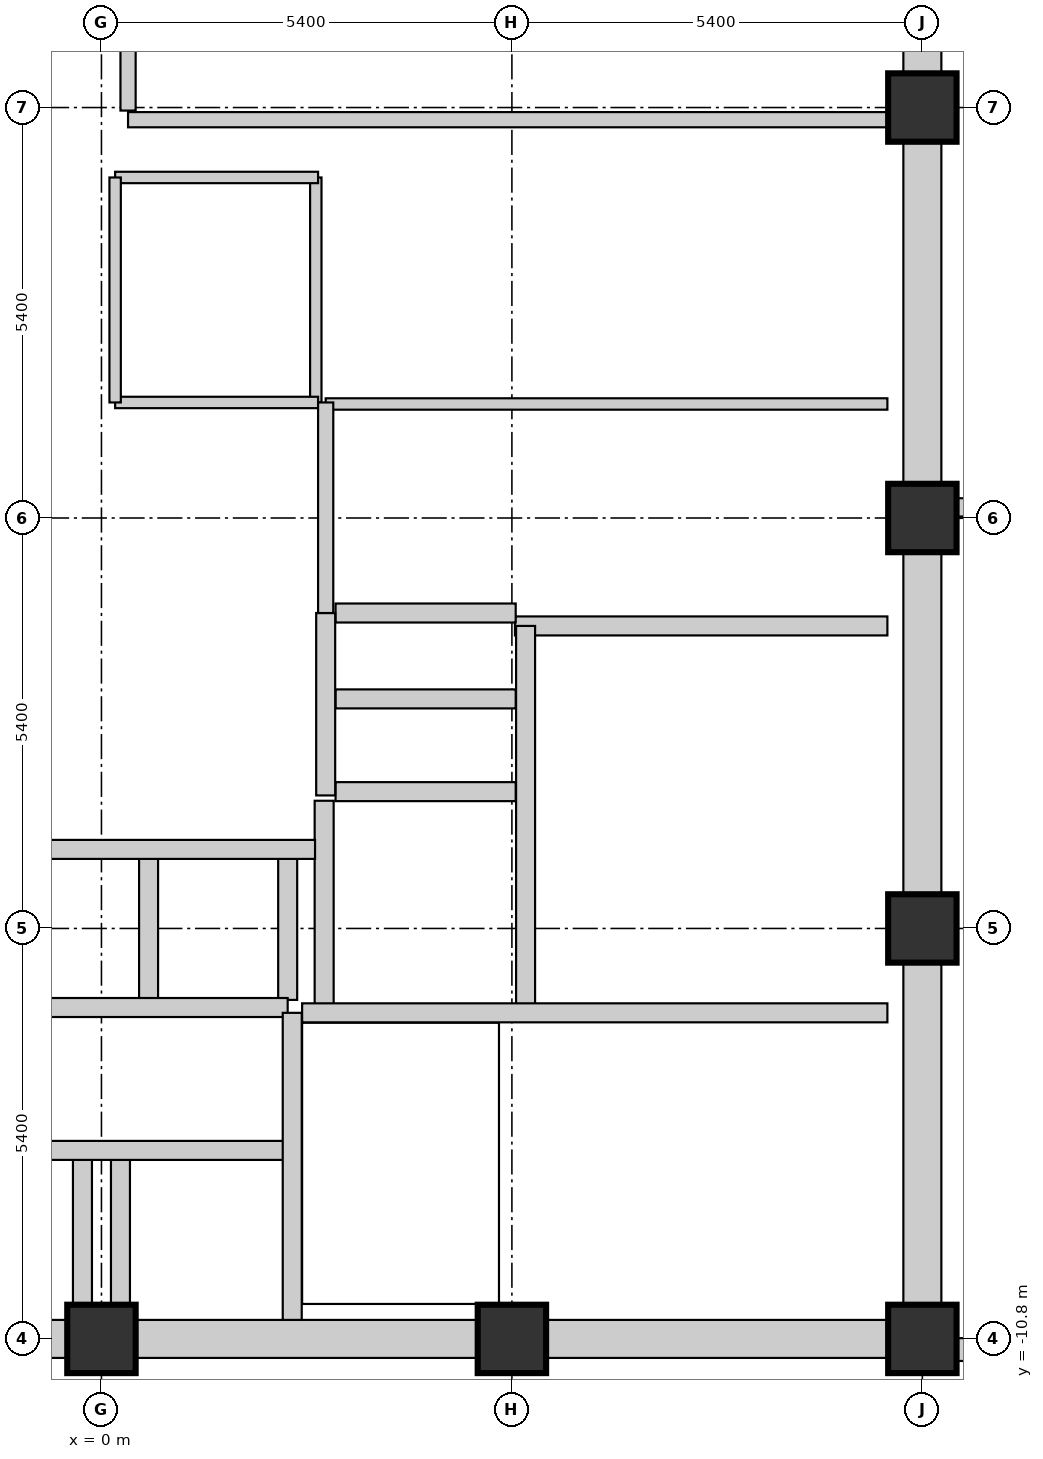
"""IFC4 building model, lengths in metres.
Left out: names, types, materials, properties, quantities, classifications, styles, units other than length and angle.
Written with IfcOpenShell. Run it as: python <this file> out.ifc"""

import sys

from ifc_helpers import new_model, si_unit, direction, frame, frame_2d, origin, origin_2d, place, context, subcontext, project, spatial, rectangle, extrude, element, fill, save


model = new_model("IFC4")
c1 = context("Model", 3, precision=1e-05, world=origin(), true_north=direction((0.0, 1.0)))
c2 = subcontext(c1, "Body", "Model", "MODEL_VIEW")
j1 = project(units=[si_unit("LENGTHUNIT", "METRE"), si_unit("PLANEANGLEUNIT", "RADIAN")], contexts=[c1])
p1 = place(None, origin())
s1 = spatial("IfcSite", under=j1, at=p1, CompositionType="ELEMENT")
p2 = place(p1, origin())
s2 = spatial("IfcBuilding", under=s1, at=p2, CompositionType="ELEMENT")
p3 = place(p2, frame((0.0, 0.0, 337.5)))
s3 = spatial("IfcBuildingStorey", under=s2, at=p3, CompositionType="ELEMENT", Elevation=337.5)
for number, where, z_axis, x_axis in (
    (1, (0.0, -10.8, 0.0), (0.0, 0.0, 1.0), (1.0, 0.0, 0.0)),
    (2, (5.4, -10.8, 0.0), (0.0, 0.0, 1.0), (1.0, 0.0, 0.0)),
    (3, (10.8, -10.8, 0.0), (0.0, 0.0, 1.0), (1.0, 0.0, 0.0)),
    (4, (10.8, -5.4, 0.0), (0.0, 0.0, 1.0), (1.0, 0.0, 0.0)),
    (5, (10.8, 0.0, 0.0), (0.0, 0.0, 1.0), (1.0, 0.0, 0.0)),
    (6, (10.8, 5.4, 0.0), (0.0, 0.0, 1.0), (1.0, 0.0, 0.0)),
):
    element("IfcColumn", number, at=place(p3, frame(where, z_axis=z_axis, x_axis=x_axis)), inside=s3, PredefinedType="COLUMN", context=c2, shape_type="SweptSolid", body=[
        extrude(rectangle(XDim=0.9, YDim=0.9, at=origin_2d()), origin(), (0.0, 0.0, 1.0), 4.5),
    ])
for number, where, z_axis, x_axis in (
    (7, (10.8, -10.34, 0.0), (0.0, 0.0, 1.0), (0.0, 1.0, 0.0)),
    (8, (-4.94, -10.8, 0.0), (0.0, 0.0, 1.0), (1.0, 0.0, 0.0)),
    (9, (10.8, -4.94, 0.0), (0.0, 0.0, 1.0), (0.0, 1.0, 0.0)),
    (10, (0.46, -10.8, 0.0), (0.0, 0.0, 1.0), (1.0, 0.0, 0.0)),
    (11, (10.8, 0.46, 0.0), (0.0, 0.0, 1.0), (0.0, 1.0, 0.0)),
    (12, (5.86, -10.8, 0.0), (0.0, 0.0, 1.0), (1.0, 0.0, 0.0)),
    (13, (10.8, 5.86, 0.0), (0.0, 0.0, 1.0), (0.0, 1.0, 0.0)),
):
    element("IfcWall", number, at=place(p3, frame(where, z_axis=z_axis, x_axis=x_axis)), inside=s3, PredefinedType="SHEAR", context=c2, shape_type="SweptSolid", body=[
        extrude(rectangle(XDim=4.48, YDim=0.5, at=frame_2d((2.24, 0.0))), origin(), (0.0, 0.0, 1.0), 4.5),
    ])
p4 = place(p3, frame((11.254, -10.94, 0.0), z_axis=(0.0, 0.0, 1.0), x_axis=(1.0, 0.0, 0.0)))
e14 = element("IfcWall", 14, at=p4, inside=s3, PredefinedType="STANDARD", context=c2, shape_type="SweptSolid", body=[
    extrude(rectangle(XDim=3.706, YDim=0.3, at=frame_2d((1.853, 0.0))), origin(), (0.0, 0.0, 1.0), 3.507),
])
p5 = place(p4, frame((1.328, 0.0, 0.75)))
e15 = element("IfcOpeningElement", 15, at=p5, cuts=e14, PredefinedType="OPENING", context=c2, shape_type="SweptSolid", body=[
    extrude(rectangle(XDim=1.05, YDim=1.5, at=frame_2d((0.525, 0.75))), frame((0.0, 0.16, 0.0), z_axis=(0.0, -1.0, 0.0), x_axis=(1.0, 0.0, 0.0)), (0.0, 0.0, 1.0), 0.32),
])
p6 = place(p3, frame((11.254, 0.14, 0.0), z_axis=(0.0, 0.0, 1.0), x_axis=(1.0, 0.0, 0.0)))
e16 = element("IfcWall", 16, at=p6, inside=s3, PredefinedType="STANDARD", context=c2, shape_type="SweptSolid", body=[
    extrude(rectangle(XDim=0.606, YDim=0.24, at=frame_2d((0.303, 0.0))), origin(), (0.0, 0.0, 1.0), 3.507),
])
p7 = place(p3, frame((2.93, -6.51, 0.0), z_axis=(0.0, 0.0, 1.0), x_axis=(0.0, 1.0, 0.0)))
e17 = element("IfcWall", 17, at=p7, inside=s3, PredefinedType="SHEAR", context=c2, shape_type="SweptSolid", body=[
    extrude(rectangle(XDim=2.79, YDim=0.25, at=frame_2d((1.395, 0.0))), origin(), (0.0, 0.0, 1.0), 4.5),
])
p8 = place(p3, frame((5.44, -1.42, 0.0), z_axis=(0.0, 0.0, 1.0), x_axis=(1.0, 0.0, 0.0)))
e18 = element("IfcWall", 18, at=p8, inside=s3, PredefinedType="SHEAR", context=c2, shape_type="SweptSolid", body=[
    extrude(rectangle(XDim=4.9, YDim=0.25, at=frame_2d((2.45, 0.0))), origin(), (0.0, 0.0, 1.0), 4.5),
])
p9 = place(p8, frame((1.94, 0.0, 0.0)))
e19 = element("IfcOpeningElement", 19, at=p9, cuts=e18, PredefinedType="OPENING", context=c2, shape_type="SweptSolid", body=[
    extrude(rectangle(XDim=1.1, YDim=2.1, at=frame_2d((0.55, 1.05))), frame((0.0, 0.135, 0.0), z_axis=(0.0, -1.0, 0.0), x_axis=(1.0, 0.0, 0.0)), (0.0, 0.0, 1.0), 0.27),
])
p10 = place(p3, frame((3.08, -3.6, 0.0), z_axis=(0.0, 0.0, 1.0), x_axis=(1.0, 0.0, 0.0)))
e20 = element("IfcWall", 20, at=p10, inside=s3, PredefinedType="SHEAR", context=c2, shape_type="SweptSolid", body=[
    extrude(rectangle(XDim=2.37, YDim=0.25, at=frame_2d((1.185, 0.0))), origin(), (0.0, 0.0, 1.0), 4.5),
])
p11 = place(p3, frame((5.58, -6.51, 0.0), z_axis=(0.0, 0.0, 1.0), x_axis=(0.0, 1.0, 0.0)))
e21 = element("IfcWall", 21, at=p11, inside=s3, PredefinedType="SHEAR", context=c2, shape_type="SweptSolid", body=[
    extrude(rectangle(XDim=5.09, YDim=0.25, at=frame_2d((2.545, 0.0))), origin(), (0.0, 0.0, 1.0), 4.5),
])
p12 = place(p11, frame((0.85, 0.0, 0.0)))
e22 = element("IfcOpeningElement", 22, at=p12, cuts=e21, PredefinedType="OPENING", context=c2, shape_type="SweptSolid", body=[
    extrude(rectangle(XDim=1.1, YDim=2.1, at=frame_2d((0.55, 1.05))), frame((0.0, 0.135, 0.0), z_axis=(0.0, -1.0, 0.0), x_axis=(1.0, 0.0, 0.0)), (0.0, 0.0, 1.0), 0.27),
])
for number, where, z_axis, x_axis in (
    (23, (0.62, -6.34, 0.0), (0.0, 0.0, 1.0), (0.0, 1.0, 0.0)),
    (24, (2.45, -6.34, 0.0), (0.0, 0.0, 1.0), (0.0, 1.0, 0.0)),
):
    element("IfcWall", number, at=place(p3, frame(where, z_axis=z_axis, x_axis=x_axis)), inside=s3, PredefinedType="SHEAR", context=c2, shape_type="SweptSolid", body=[
        extrude(rectangle(XDim=1.88, YDim=0.25, at=frame_2d((0.94, 0.0))), origin(), (0.0, 0.0, 1.0), 4.5),
    ])
for number, where, z_axis, x_axis in (
    (25, (-0.25, -10.35, 0.0), (0.0, 0.0, 1.0), (0.0, 1.0, 0.0)),
    (26, (0.25, -10.35, 0.0), (0.0, 0.0, 1.0), (0.0, 1.0, 0.0)),
):
    element("IfcWall", number, at=place(p3, frame(where, z_axis=z_axis, x_axis=x_axis)), inside=s3, PredefinedType="SHEAR", context=c2, shape_type="SweptSolid", body=[
        extrude(rectangle(XDim=1.91, YDim=0.25, at=frame_2d((0.955, 0.0))), origin(), (0.0, 0.0, 1.0), 4.5),
    ])
p13 = place(p3, frame((-1.22, -6.44, 0.0), z_axis=(0.0, 0.0, 1.0), x_axis=(1.0, 0.0, 0.0)))
e27 = element("IfcWall", 27, at=p13, inside=s3, PredefinedType="SHEAR", context=c2, shape_type="SweptSolid", body=[
    extrude(rectangle(XDim=3.67, YDim=0.25, at=frame_2d((1.835, 0.0))), origin(), (0.0, 0.0, 1.0), 4.5),
])
p14 = place(p13, frame((0.35, 0.0, 0.0)))
e28 = element("IfcOpeningElement", 28, at=p14, cuts=e27, PredefinedType="OPENING", context=c2, shape_type="SweptSolid", body=[
    extrude(rectangle(XDim=1.1, YDim=2.1, at=frame_2d((0.55, 1.05))), frame((0.0, 0.135, 0.0), z_axis=(0.0, -1.0, 0.0), x_axis=(1.0, 0.0, 0.0)), (0.0, 0.0, 1.0), 0.27),
])
p15 = place(p13, frame((2.22, 0.0, 0.0)))
e29 = element("IfcOpeningElement", 29, at=p15, cuts=e27, PredefinedType="OPENING", context=c2, shape_type="SweptSolid", body=[
    extrude(rectangle(XDim=1.1, YDim=2.1, at=frame_2d((0.55, 1.05))), frame((0.0, 0.135, 0.0), z_axis=(0.0, -1.0, 0.0), x_axis=(1.0, 0.0, 0.0)), (0.0, 0.0, 1.0), 0.27),
])
p16 = place(p3, frame((-2.48, -8.32, 0.0), z_axis=(0.0, 0.0, 1.0), x_axis=(1.0, 0.0, 0.0)))
e30 = element("IfcWall", 30, at=p16, inside=s3, PredefinedType="SHEAR", context=c2, shape_type="SweptSolid", body=[
    extrude(rectangle(XDim=4.93, YDim=0.25, at=frame_2d((2.465, 0.0))), origin(), (0.0, 0.0, 1.0), 4.5),
])
p17 = place(p16, frame((0.55, 0.0, 0.0)))
e31 = element("IfcOpeningElement", 31, at=p17, cuts=e30, PredefinedType="OPENING", context=c2, shape_type="SweptSolid", body=[
    extrude(rectangle(XDim=1.1, YDim=2.1, at=frame_2d((0.55, 1.05))), frame((0.0, 0.135, 0.0), z_axis=(0.0, -1.0, 0.0), x_axis=(1.0, 0.0, 0.0)), (0.0, 0.0, 1.0), 0.27),
])
p18 = place(p16, frame((3.25, 0.0, 0.0)))
e32 = element("IfcOpeningElement", 32, at=p18, cuts=e30, PredefinedType="OPENING", context=c2, shape_type="SweptSolid", body=[
    extrude(rectangle(XDim=1.1, YDim=2.1, at=frame_2d((0.55, 1.05))), frame((0.0, 0.135, 0.0), z_axis=(0.0, -1.0, 0.0), x_axis=(1.0, 0.0, 0.0)), (0.0, 0.0, 1.0), 0.27),
])
p19 = place(p3, frame((-1.22, -4.36, 0.0), z_axis=(0.0, 0.0, 1.0), x_axis=(1.0, 0.0, 0.0)))
e33 = element("IfcWall", 33, at=p19, inside=s3, PredefinedType="SHEAR", context=c2, shape_type="SweptSolid", body=[
    extrude(rectangle(XDim=4.03, YDim=0.25, at=frame_2d((2.015, 0.0))), origin(), (0.0, 0.0, 1.0), 4.5),
])
for number, where, z_axis, x_axis in (
    (34, (3.08, -2.38, 0.0), (0.0, 0.0, 1.0), (1.0, 0.0, 0.0)),
    (35, (3.08, -1.25, 0.0), (0.0, 0.0, 1.0), (1.0, 0.0, 0.0)),
):
    element("IfcWall", number, at=place(p3, frame(where, z_axis=z_axis, x_axis=x_axis)), inside=s3, PredefinedType="SHEAR", context=c2, shape_type="SweptSolid", body=[
        extrude(rectangle(XDim=2.37, YDim=0.25, at=frame_2d((1.185, 0.0))), origin(), (0.0, 0.0, 1.0), 4.5),
    ])
p20 = place(p3, frame((2.95, -3.65, 0.0), z_axis=(0.0, 0.0, 1.0), x_axis=(0.0, 1.0, 0.0)))
e36 = element("IfcWall", 36, at=p20, inside=s3, PredefinedType="SHEAR", context=c2, shape_type="SweptSolid", body=[
    extrude(rectangle(XDim=2.4, YDim=0.25, at=frame_2d((1.2, 0.0))), origin(), (0.0, 0.0, 1.0), 4.5),
])
p21 = place(p20, frame((0.775, 0.0, 0.0)))
e37 = element("IfcOpeningElement", 37, at=p21, cuts=e36, PredefinedType="OPENING", context=c2, shape_type="SweptSolid", body=[
    extrude(rectangle(XDim=0.85, YDim=2.1, at=frame_2d((0.425, 1.05))), frame((0.0, 0.135, 0.0), z_axis=(0.0, -1.0, 0.0), x_axis=(1.0, 0.0, 0.0)), (0.0, 0.0, 1.0), 0.27),
])
p22 = place(p3, frame((2.64, -6.51, 0.0), z_axis=(0.0, 0.0, 1.0), x_axis=(1.0, 0.0, 0.0)))
e38 = element("IfcWall", 38, at=p22, inside=s3, PredefinedType="SHEAR", context=c2, shape_type="SweptSolid", body=[
    extrude(rectangle(XDim=7.7, YDim=0.25, at=frame_2d((3.85, 0.0))), origin(), (0.0, 0.0, 1.0), 4.5),
])
p23 = place(p22, frame((6.0, 0.0, 0.0)))
e39 = element("IfcOpeningElement", 39, at=p23, cuts=e38, PredefinedType="OPENING", context=c2, shape_type="SweptSolid", body=[
    extrude(rectangle(XDim=0.95, YDim=2.1, at=frame_2d((0.475, 1.05))), frame((0.0, 0.135, 0.0), z_axis=(0.0, -1.0, 0.0), x_axis=(1.0, 0.0, 0.0)), (0.0, 0.0, 1.0), 0.27),
])
p24 = place(p3, frame((2.51, -10.55, 0.0), z_axis=(0.0, 0.0, 1.0), x_axis=(0.0, 1.0, 0.0)))
e40 = element("IfcWall", 40, at=p24, inside=s3, PredefinedType="SHEAR", context=c2, shape_type="SweptSolid", body=[
    extrude(rectangle(XDim=4.04, YDim=0.25, at=frame_2d((2.02, 0.0))), origin(), (0.0, 0.0, 1.0), 4.5),
])
p25 = place(p3, frame((2.82, 1.52, 0.0), z_axis=(0.0, 0.0, 1.0), x_axis=(0.0, 1.0, 0.0)))
e41 = element("IfcWall", 41, at=p25, inside=s3, PredefinedType="PARTITIONING", context=c2, shape_type="SweptSolid", body=[
    extrude(rectangle(XDim=2.96, YDim=0.15, at=frame_2d((1.48, 0.0))), origin(), (0.0, 0.0, 1.0), 4.22),
])
for number, where, z_axis, x_axis in (
    (42, (0.18, 4.48, 0.0), (0.0, 0.0, 1.0), (1.0, 0.0, 0.0)),
    (43, (0.18, 1.52, 0.0), (0.0, 0.0, 1.0), (1.0, 0.0, 0.0)),
):
    element("IfcWall", number, at=place(p3, frame(where, z_axis=z_axis, x_axis=x_axis)), inside=s3, PredefinedType="PARTITIONING", context=c2, shape_type="SweptSolid", body=[
        extrude(rectangle(XDim=2.67, YDim=0.15, at=frame_2d((1.335, 0.0))), origin(), (0.0, 0.0, 1.0), 4.22),
    ])
p26 = place(p3, frame((0.18, 1.52, 0.0), z_axis=(0.0, 0.0, 1.0), x_axis=(0.0, 1.0, 0.0)))
e44 = element("IfcWall", 44, at=p26, inside=s3, PredefinedType="PARTITIONING", context=c2, shape_type="SweptSolid", body=[
    extrude(rectangle(XDim=2.96, YDim=0.15, at=frame_2d((1.48, 0.0))), origin(), (0.0, 0.0, 1.0), 4.22),
])
p27 = place(p26, frame((0.95, 0.0, 0.0)))
e45 = element("IfcOpeningElement", 45, at=p27, cuts=e44, PredefinedType="OPENING", context=c2, shape_type="SweptSolid", body=[
    extrude(rectangle(XDim=0.85, YDim=2.1, at=frame_2d((0.425, 1.05))), frame((0.0, 0.085, 0.0), z_axis=(0.0, -1.0, 0.0), x_axis=(1.0, 0.0, 0.0)), (0.0, 0.0, 1.0), 0.17),
])
p28 = place(p3, frame((2.95, 1.5, 0.0), z_axis=(0.0, 0.0, 1.0), x_axis=(1.0, 0.0, 0.0)))
e46 = element("IfcWall", 46, at=p28, inside=s3, PredefinedType="PARTITIONING", context=c2, shape_type="SweptSolid", body=[
    extrude(rectangle(XDim=7.39, YDim=0.15, at=frame_2d((3.695, 0.0))), origin(), (0.0, 0.0, 1.0), 4.22),
])
p29 = place(p28, frame((2.2, 0.0, 0.0)))
e47 = element("IfcOpeningElement", 47, at=p29, cuts=e46, PredefinedType="OPENING", context=c2, shape_type="SweptSolid", body=[
    extrude(rectangle(XDim=0.95, YDim=2.1, at=frame_2d((0.475, 1.05))), frame((0.0, 0.085, 0.0), z_axis=(0.0, -1.0, 0.0), x_axis=(1.0, 0.0, 0.0)), (0.0, 0.0, 1.0), 0.17),
])
p30 = place(p3, frame((0.35, 5.24, 0.0), z_axis=(0.0, 0.0, 1.0), x_axis=(1.0, 0.0, 0.0)))
e48 = element("IfcWall", 48, at=p30, inside=s3, PredefinedType="PARTITIONING", context=c2, shape_type="SweptSolid", body=[
    extrude(rectangle(XDim=9.99, YDim=0.2, at=frame_2d((4.995, 0.0))), origin(), (0.0, 0.0, 1.0), 4.22),
])
p31 = place(p30, frame((0.8, 0.0, 0.0)))
e49 = element("IfcOpeningElement", 49, at=p31, cuts=e48, PredefinedType="OPENING", context=c2, shape_type="SweptSolid", body=[
    extrude(rectangle(XDim=1.1, YDim=2.1, at=frame_2d((0.55, 1.05))), frame((0.0, 0.11, 0.0), z_axis=(0.0, -1.0, 0.0), x_axis=(1.0, 0.0, 0.0)), (0.0, 0.0, 1.0), 0.22),
])
p32 = place(p3, frame((0.35, 5.36, 0.0), z_axis=(0.0, 0.0, 1.0), x_axis=(0.0, 1.0, 0.0)))
e50 = element("IfcWall", 50, at=p32, inside=s3, PredefinedType="PARTITIONING", context=c2, shape_type="SweptSolid", body=[
    extrude(rectangle(XDim=4.98, YDim=0.2, at=frame_2d((2.49, 0.0))), origin(), (0.0, 0.0, 1.0), 4.22),
])
p33 = place(p3, frame((2.95, -1.25, 0.0), z_axis=(0.0, 0.0, 1.0), x_axis=(0.0, 1.0, 0.0)))
e51 = element("IfcWall", 51, at=p33, inside=s3, PredefinedType="PARTITIONING", context=c2, shape_type="SweptSolid", body=[
    extrude(rectangle(XDim=2.77, YDim=0.2, at=frame_2d((1.385, 0.0))), origin(), (0.0, 0.0, 1.0), 4.22),
])
p34 = place(p33, frame((0.6, 0.0, 0.0)))
e52 = element("IfcOpeningElement", 52, at=p34, cuts=e51, PredefinedType="OPENING", context=c2, shape_type="SweptSolid", body=[
    extrude(rectangle(XDim=1.1, YDim=2.1, at=frame_2d((0.55, 1.05))), frame((0.0, 0.11, 0.0), z_axis=(0.0, -1.0, 0.0), x_axis=(1.0, 0.0, 0.0)), (0.0, 0.0, 1.0), 0.22),
])
p35 = place(p27, origin())
e53 = element("IfcDoor", 53, at=p35, inside=s3, OperationType="SINGLE_SWING_RIGHT", PredefinedType="DOOR", context=c2, shape_type="SweptSolid", body=[
    extrude(rectangle(XDim=0.85, YDim=2.1, at=frame_2d((0.425, 1.05))), frame((0.0, 0.025, 0.0), z_axis=(0.0, -1.0, 0.0), x_axis=(1.0, 0.0, 0.0)), (0.0, 0.0, 1.0), 0.05),
])
fill(e45, e53)
p36 = place(p23, origin())
e54 = element("IfcDoor", 54, at=p36, inside=s3, OperationType="SINGLE_SWING_RIGHT", PredefinedType="DOOR", context=c2, shape_type="SweptSolid", body=[
    extrude(rectangle(XDim=0.95, YDim=2.1, at=frame_2d((0.475, 1.05))), frame((0.0, 0.025, 0.0), z_axis=(0.0, -1.0, 0.0), x_axis=(1.0, 0.0, 0.0)), (0.0, 0.0, 1.0), 0.05),
])
fill(e39, e54)
p37 = place(p21, origin())
e55 = element("IfcDoor", 55, at=p37, inside=s3, OperationType="SINGLE_SWING_LEFT", PredefinedType="DOOR", context=c2, shape_type="SweptSolid", body=[
    extrude(rectangle(XDim=0.85, YDim=2.1, at=frame_2d((0.425, 1.05))), frame((0.0, 0.025, 0.0), z_axis=(0.0, -1.0, 0.0), x_axis=(1.0, 0.0, 0.0)), (0.0, 0.0, 1.0), 0.05),
])
fill(e37, e55)
p38 = place(p9, origin())
e56 = element("IfcDoor", 56, at=p38, inside=s3, OperationType="SINGLE_SWING_LEFT", PredefinedType="DOOR", context=c2, shape_type="SweptSolid", body=[
    extrude(rectangle(XDim=1.1, YDim=2.1, at=frame_2d((0.55, 1.05))), frame((0.0, 0.025, 0.0), z_axis=(0.0, -1.0, 0.0), x_axis=(1.0, 0.0, 0.0)), (0.0, 0.0, 1.0), 0.05),
])
fill(e19, e56)
p39 = place(p12, origin())
e57 = element("IfcDoor", 57, at=p39, inside=s3, OperationType="SLIDING_TO_RIGHT", PredefinedType="DOOR", context=c2, shape_type="SweptSolid", body=[
    extrude(rectangle(XDim=1.1, YDim=2.1, at=frame_2d((0.55, 1.05))), frame((0.0, 0.025, 0.0), z_axis=(0.0, -1.0, 0.0), x_axis=(1.0, 0.0, 0.0)), (0.0, 0.0, 1.0), 0.05),
])
fill(e22, e57)
p40 = place(p31, origin())
e58 = element("IfcDoor", 58, at=p40, inside=s3, OperationType="SINGLE_SWING_LEFT", PredefinedType="DOOR", context=c2, shape_type="SweptSolid", body=[
    extrude(rectangle(XDim=1.1, YDim=2.1, at=frame_2d((0.55, 1.05))), frame((0.0, 0.025, 0.0), z_axis=(0.0, -1.0, 0.0), x_axis=(1.0, 0.0, 0.0)), (0.0, 0.0, 1.0), 0.05),
])
fill(e49, e58)
p41 = place(p34, origin())
e59 = element("IfcDoor", 59, at=p41, inside=s3, OperationType="SINGLE_SWING_LEFT", PredefinedType="DOOR", context=c2, shape_type="SweptSolid", body=[
    extrude(rectangle(XDim=1.1, YDim=2.1, at=frame_2d((0.55, 1.05))), frame((0.0, 0.025, 0.0), z_axis=(0.0, -1.0, 0.0), x_axis=(1.0, 0.0, 0.0)), (0.0, 0.0, 1.0), 0.05),
])
fill(e52, e59)
p42 = place(p29, origin())
e60 = element("IfcDoor", 60, at=p42, inside=s3, OperationType="SINGLE_SWING_RIGHT", PredefinedType="DOOR", context=c2, shape_type="SweptSolid", body=[
    extrude(rectangle(XDim=0.95, YDim=2.1, at=frame_2d((0.475, 1.05))), frame((0.0, 0.025, 0.0), z_axis=(0.0, -1.0, 0.0), x_axis=(1.0, 0.0, 0.0)), (0.0, 0.0, 1.0), 0.05),
])
fill(e47, e60)
p43 = place(p14, origin())
e61 = element("IfcDoor", 61, at=p43, inside=s3, OperationType="SLIDING_TO_LEFT", PredefinedType="DOOR", context=c2, shape_type="SweptSolid", body=[
    extrude(rectangle(XDim=1.1, YDim=2.1, at=frame_2d((0.55, 1.05))), frame((0.0, 0.025, 0.0), z_axis=(0.0, -1.0, 0.0), x_axis=(1.0, 0.0, 0.0)), (0.0, 0.0, 1.0), 0.05),
])
fill(e28, e61)
p44 = place(p15, origin())
e62 = element("IfcDoor", 62, at=p44, inside=s3, OperationType="SLIDING_TO_LEFT", PredefinedType="DOOR", context=c2, shape_type="SweptSolid", body=[
    extrude(rectangle(XDim=1.1, YDim=2.1, at=frame_2d((0.55, 1.05))), frame((0.0, 0.025, 0.0), z_axis=(0.0, -1.0, 0.0), x_axis=(1.0, 0.0, 0.0)), (0.0, 0.0, 1.0), 0.05),
])
fill(e29, e62)
p45 = place(p18, origin())
e63 = element("IfcDoor", 63, at=p45, inside=s3, OperationType="SLIDING_TO_LEFT", PredefinedType="DOOR", context=c2, shape_type="SweptSolid", body=[
    extrude(rectangle(XDim=1.1, YDim=2.1, at=frame_2d((0.55, 1.05))), frame((0.0, 0.025, 0.0), z_axis=(0.0, -1.0, 0.0), x_axis=(1.0, 0.0, 0.0)), (0.0, 0.0, 1.0), 0.05),
])
fill(e32, e63)
save(model, sys.argv[1])
